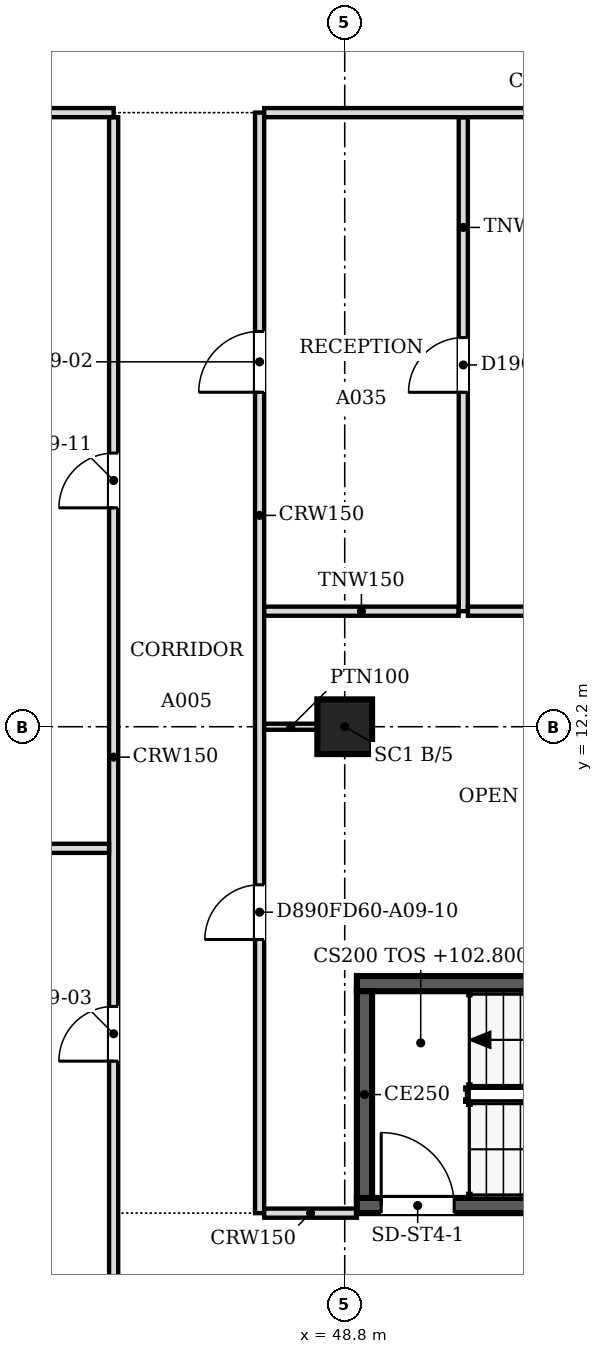
"""IFC4 building model, lengths in metres.
Left out: names, types, materials, properties, quantities, classifications, styles, units other than length and angle.
Written with IfcOpenShell. Run it as: python <this file> out.ifc"""

import sys

from ifc_helpers import new_model, si_unit, direction, frame, frame_2d, origin, origin_2d, place, context, subcontext, project, spatial, rectangle, extrude, source, transform, mapped, element, fill, save


model = new_model("IFC4")
c1 = context("Model", 3, precision=1e-05, world=origin(), true_north=direction((0.0, 1.0)))
c2 = subcontext(c1, "Body", "Model", "MODEL_VIEW")
j1 = project(units=[si_unit("LENGTHUNIT", "METRE"), si_unit("PLANEANGLEUNIT", "RADIAN")], contexts=[c1])
p1 = place(None, origin())
s1 = spatial("IfcSite", under=j1, at=p1, CompositionType="ELEMENT")
p2 = place(p1, origin())
s2 = spatial("IfcBuilding", under=s1, at=p2, CompositionType="ELEMENT")
p3 = place(p2, frame((0.0, 0.0, 102.8)))
s3 = spatial("IfcBuildingStorey", under=s2, at=p3, CompositionType="ELEMENT", Elevation=102.8)
p4 = place(p3, frame((48.8, 12.2, 0.0), z_axis=(0.0, 0.0, 1.0), x_axis=(1.0, 0.0, 0.0)))
e1 = element("IfcColumn", 1, at=p4, inside=s3, PredefinedType="COLUMN", context=c2, shape_type="SweptSolid", body=[
    extrude(rectangle(XDim=0.9, YDim=0.9, at=origin_2d()), origin(), (0.0, 0.0, 1.0), 3.55),
])
p5 = place(p3, frame((57.5, 4.325, 0.0), z_axis=(0.0, 0.0, 1.0), x_axis=(-1.0, 0.0, 0.0)))
e2 = element("IfcWall", 2, at=p5, inside=s3, PredefinedType="SOLIDWALL", context=c2, shape_type="SweptSolid", body=[
    extrude(rectangle(XDim=8.5, YDim=0.25, at=frame_2d((4.25, 0.0))), origin(), (0.0, 0.0, 1.0), 3.8),
])
m1 = source(origin(), c2, "Body", "SweptSolid", [
    extrude(rectangle(XDim=1.2, YDim=2.1, at=frame_2d((0.6, 1.05))), frame((0.0, 0.135, 0.0), z_axis=(0.0, -1.0, 0.0), x_axis=(1.0, 0.0, 0.0)), (0.0, 0.0, 1.0), 0.27),
])
p6 = place(p5, frame((6.9, 0.0, 0.0)))
e3 = element("IfcOpeningElement", 3, at=p6, cuts=e2, PredefinedType="OPENING", context=c2, shape_type="MappedRepresentation", body=[
    mapped(m1, transform((0.0, 0.0, 0.0), scale=1.0)),
])
p7 = place(p3, frame((49.125, 4.45, 0.0), z_axis=(0.0, 0.0, 1.0), x_axis=(0.0, 1.0, 0.0)))
e4 = element("IfcWall", 4, at=p7, inside=s3, PredefinedType="SOLIDWALL", context=c2, shape_type="SweptSolid", body=[
    extrude(rectangle(XDim=3.4, YDim=0.25, at=frame_2d((1.7, 0.0))), origin(), (0.0, 0.0, 1.0), 3.8),
])
p8 = place(p3, frame((49.0, 7.975, 0.0), z_axis=(0.0, 0.0, 1.0), x_axis=(1.0, 0.0, 0.0)))
e5 = element("IfcWall", 5, at=p8, inside=s3, PredefinedType="SOLIDWALL", context=c2, shape_type="SweptSolid", body=[
    extrude(rectangle(XDim=8.5, YDim=0.25, at=frame_2d((4.25, 0.0))), origin(), (0.0, 0.0, 1.0), 3.8),
])
p9 = place(p3, frame((45.0, 0.5, 0.0), z_axis=(0.0, 0.0, 1.0), x_axis=(0.0, 1.0, 0.0)))
e6 = element("IfcWall", 6, at=p9, inside=s3, PredefinedType="PARTITIONING", context=c2, shape_type="SweptSolid", body=[
    extrude(rectangle(XDim=21.724, YDim=0.15, at=frame_2d((10.862, 0.0))), origin(), (0.0, 0.0, 1.0), 2.715),
])
m2 = source(origin(), c2, "Body", "SweptSolid", [
    extrude(rectangle(XDim=0.9, YDim=2.1, at=frame_2d((0.45, 1.05))), frame((0.0, 0.085, 0.0), z_axis=(0.0, -1.0, 0.0), x_axis=(1.0, 0.0, 0.0)), (0.0, 0.0, 1.0), 0.17),
])
p10 = place(p9, frame((6.2, 0.0, 0.0)))
e7 = element("IfcOpeningElement", 7, at=p10, cuts=e6, PredefinedType="OPENING", context=c2, shape_type="MappedRepresentation", body=[
    mapped(m2, transform((0.0, 0.0, 0.0), scale=1.0)),
])
p11 = place(p9, frame((15.3, 0.0, 0.0)))
e8 = element("IfcOpeningElement", 8, at=p11, cuts=e6, PredefinedType="OPENING", context=c2, shape_type="MappedRepresentation", body=[
    mapped(m2, transform((0.0, 0.0, 0.0), scale=1.0)),
])
p12 = place(p3, frame((47.4, 22.3, 0.0), z_axis=(0.0, 0.0, 1.0), x_axis=(0.0, -1.0, 0.0)))
e9 = element("IfcWall", 9, at=p12, inside=s3, PredefinedType="PARTITIONING", context=c2, shape_type="SweptSolid", body=[
    extrude(rectangle(XDim=18.1, YDim=0.15, at=frame_2d((9.05, 0.0))), origin(), (0.0, 0.0, 1.0), 2.715),
])
m3 = source(origin(), c2, "Body", "SweptSolid", [
    extrude(rectangle(XDim=1.0, YDim=2.1, at=frame_2d((0.5, 1.05))), frame((0.0, 0.085, 0.0), z_axis=(0.0, -1.0, 0.0), x_axis=(1.0, 0.0, 0.0)), (0.0, 0.0, 1.0), 0.17),
])
p13 = place(p12, frame((3.599, 0.0, 0.0)))
e10 = element("IfcOpeningElement", 10, at=p13, cuts=e9, PredefinedType="OPENING", context=c2, shape_type="MappedRepresentation", body=[
    mapped(m3, transform((0.0, 0.0, 0.0), scale=1.0)),
])
p14 = place(p12, frame((12.7, 0.0, 0.0)))
e11 = element("IfcOpeningElement", 11, at=p14, cuts=e9, PredefinedType="OPENING", context=c2, shape_type="MappedRepresentation", body=[
    mapped(m2, transform((0.0, 0.0, 0.0), scale=1.0)),
])
p15 = place(p3, frame((47.476, 4.2, 0.0), z_axis=(0.0, 0.0, 1.0), x_axis=(1.0, 0.0, 0.0)))
e12 = element("IfcWall", 12, at=p15, inside=s3, PredefinedType="PARTITIONING", context=c2, shape_type="SweptSolid", body=[
    extrude(rectangle(XDim=1.524, YDim=0.15, at=frame_2d((0.762, 0.0))), origin(), (0.0, 0.0, 1.0), 2.715),
])
p16 = place(p3, frame((27.575, 10.2, 0.0), z_axis=(0.0, 0.0, 1.0), x_axis=(1.0, 0.0, 0.0)))
e13 = element("IfcWall", 13, at=p16, inside=s3, PredefinedType="PARTITIONING", context=c2, shape_type="SweptSolid", body=[
    extrude(rectangle(XDim=17.349, YDim=0.15, at=frame_2d((8.675, 0.0))), origin(), (0.0, 0.0, 1.0), 2.715),
])
p17 = place(p3, frame((48.35, 12.2, 0.0), z_axis=(0.0, 0.0, 1.0), x_axis=(-1.0, 0.0, 0.0)))
e14 = element("IfcWall", 14, at=p17, inside=s3, PredefinedType="PARTITIONING", context=c2, shape_type="SweptSolid", body=[
    extrude(rectangle(XDim=0.875, YDim=0.1, at=frame_2d((0.438, 0.0))), origin(), (0.0, 0.0, 1.0), 2.715),
])
p18 = place(p3, frame((47.476, 14.1, 0.0), z_axis=(0.0, 0.0, 1.0), x_axis=(1.0, 0.0, 0.0)))
e15 = element("IfcWall", 15, at=p18, inside=s3, PredefinedType="PARTITIONING", context=c2, shape_type="SweptSolid", body=[
    extrude(rectangle(XDim=3.198, YDim=0.15, at=frame_2d((1.599, 0.0))), origin(), (0.0, 0.0, 1.0), 2.715),
])
p19 = place(p3, frame((50.75, 22.224, 0.0), z_axis=(0.0, 0.0, 1.0), x_axis=(0.0, -1.0, 0.0)))
e16 = element("IfcWall", 16, at=p19, inside=s3, PredefinedType="PARTITIONING", context=c2, shape_type="SweptSolid", body=[
    extrude(rectangle(XDim=8.124, YDim=0.15, at=frame_2d((4.062, 0.0))), origin(), (0.0, 0.0, 1.0), 2.715),
])
p20 = place(p19, frame((3.624, 0.0, 0.0)))
e17 = element("IfcOpeningElement", 17, at=p20, cuts=e16, PredefinedType="OPENING", context=c2, shape_type="MappedRepresentation", body=[
    mapped(m2, transform((0.0, 0.0, 0.0), scale=1.0)),
])
p21 = place(p3, frame((50.826, 14.1, 0.0), z_axis=(0.0, 0.0, 1.0), x_axis=(1.0, 0.0, 0.0)))
e18 = element("IfcWall", 18, at=p21, inside=s3, PredefinedType="PARTITIONING", context=c2, shape_type="SweptSolid", body=[
    extrude(rectangle(XDim=9.674, YDim=0.15, at=frame_2d((4.837, 0.0))), origin(), (0.0, 0.0, 1.0), 2.715),
])
p22 = place(p3, frame((30.5, 22.3, 0.0), z_axis=(0.0, 0.0, 1.0), x_axis=(1.0, 0.0, 0.0)))
e19 = element("IfcWall", 19, at=p22, inside=s3, PredefinedType="PARTITIONING", context=c2, shape_type="SweptSolid", body=[
    extrude(rectangle(XDim=14.5, YDim=0.15, at=frame_2d((7.25, 0.0))), origin(), (0.0, 0.0, 1.0), 2.715),
])
p23 = place(p3, frame((47.476, 22.3, 0.0), z_axis=(0.0, 0.0, 1.0), x_axis=(1.0, 0.0, 0.0)))
e20 = element("IfcWall", 20, at=p23, inside=s3, PredefinedType="PARTITIONING", context=c2, shape_type="SweptSolid", body=[
    extrude(rectangle(XDim=9.448, YDim=0.15, at=frame_2d((4.724, 0.0))), origin(), (0.0, 0.0, 1.0), 2.715),
])
m4 = source(origin(), c2, "Body", "SweptSolid", [
    extrude(rectangle(XDim=1.2, YDim=2.1, at=frame_2d((0.6, 1.05))), frame((0.0, 0.025, 0.0), z_axis=(0.0, -1.0, 0.0), x_axis=(1.0, 0.0, 0.0)), (0.0, 0.0, 1.0), 0.05),
])
p24 = place(p6, origin())
e21 = element("IfcDoor", 21, at=p24, inside=s3, OperationType="SINGLE_SWING_RIGHT", PredefinedType="DOOR", context=c2, shape_type="MappedRepresentation", body=[
    mapped(m4, transform((0.0, 0.0, 0.0), scale=1.0)),
])
fill(e3, e21)
m5 = source(origin(), c2, "Body", "SweptSolid", [
    extrude(rectangle(XDim=0.9, YDim=2.1, at=frame_2d((0.45, 1.05))), frame((0.0, 0.025, 0.0), z_axis=(0.0, -1.0, 0.0), x_axis=(1.0, 0.0, 0.0)), (0.0, 0.0, 1.0), 0.05),
])
p25 = place(p10, origin())
e22 = element("IfcDoor", 22, at=p25, inside=s3, OperationType="SINGLE_SWING_LEFT", PredefinedType="DOOR", context=c2, shape_type="MappedRepresentation", body=[
    mapped(m5, transform((0.0, 0.0, 0.0), scale=1.0)),
])
fill(e7, e22)
p26 = place(p20, origin())
e23 = element("IfcDoor", 23, at=p26, inside=s3, OperationType="SINGLE_SWING_RIGHT", PredefinedType="DOOR", context=c2, shape_type="MappedRepresentation", body=[
    mapped(m5, transform((0.0, 0.0, 0.0), scale=1.0)),
])
fill(e17, e23)
m6 = source(origin(), c2, "Body", "SweptSolid", [
    extrude(rectangle(XDim=1.0, YDim=2.1, at=frame_2d((0.5, 1.05))), frame((0.0, 0.025, 0.0), z_axis=(0.0, -1.0, 0.0), x_axis=(1.0, 0.0, 0.0)), (0.0, 0.0, 1.0), 0.05),
])
p27 = place(p13, origin())
e24 = element("IfcDoor", 24, at=p27, inside=s3, OperationType="SINGLE_SWING_RIGHT", PredefinedType="DOOR", context=c2, shape_type="MappedRepresentation", body=[
    mapped(m6, transform((0.0, 0.0, 0.0), scale=1.0)),
])
fill(e10, e24)
p28 = place(p14, origin())
e25 = element("IfcDoor", 25, at=p28, inside=s3, OperationType="SINGLE_SWING_RIGHT", PredefinedType="DOOR", context=c2, shape_type="MappedRepresentation", body=[
    mapped(m5, transform((0.0, 0.0, 0.0), scale=1.0)),
])
fill(e11, e25)
p29 = place(p11, origin())
e26 = element("IfcDoor", 26, at=p29, inside=s3, OperationType="SINGLE_SWING_LEFT", PredefinedType="DOOR", context=c2, shape_type="MappedRepresentation", body=[
    mapped(m5, transform((0.0, 0.0, 0.0), scale=1.0)),
])
fill(e8, e26)
save(model, sys.argv[1])
